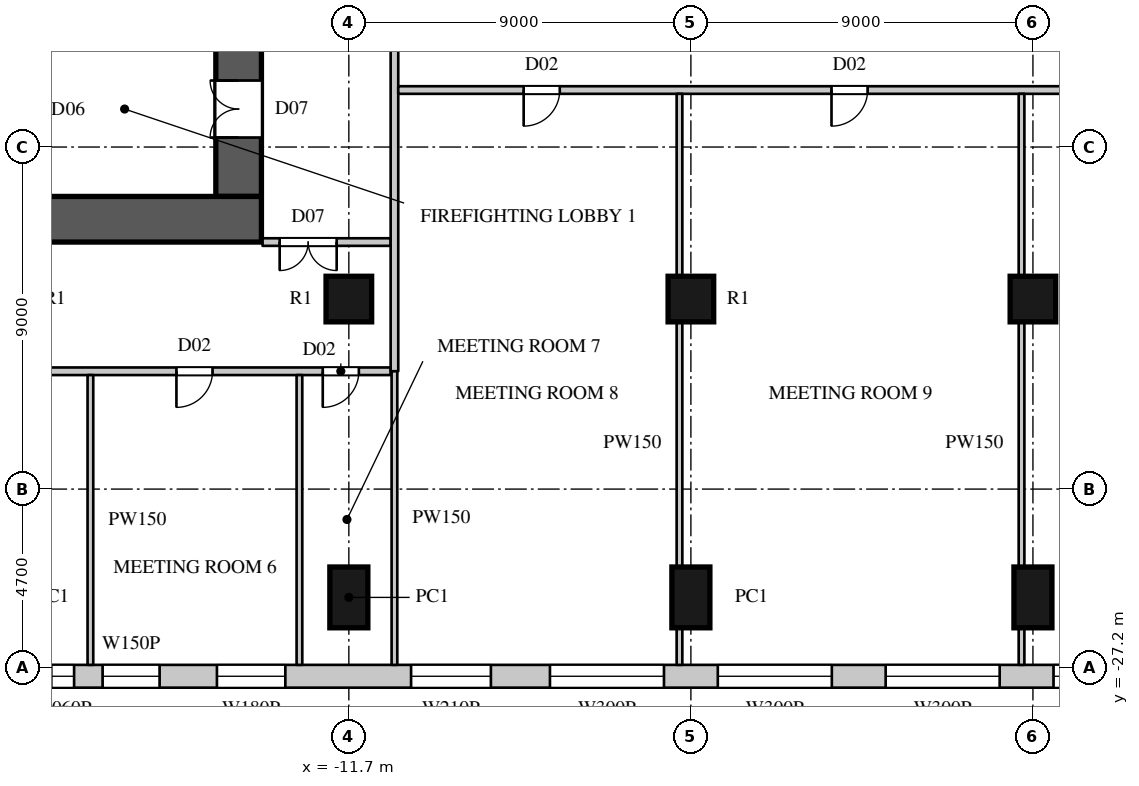
"""IFC4 building model, lengths in metres.
Left out: names, types, materials, properties, quantities, classifications, styles, units other than length and angle.
Written with IfcOpenShell. Run it as: python <this file> out.ifc"""

import sys

from ifc_helpers import new_model, si_unit, direction, frame, frame_2d, origin, origin_2d, place, context, subcontext, project, spatial, rectangle, circle, extrude, element, fill, save


model = new_model("IFC4")
c1 = context("Model", 3, precision=1e-05, world=origin(), true_north=direction((0.0, 1.0)))
c2 = subcontext(c1, "Body", "Model", "MODEL_VIEW")
j1 = project(units=[si_unit("LENGTHUNIT", "METRE"), si_unit("PLANEANGLEUNIT", "RADIAN")], contexts=[c1])
p1 = place(None, origin())
s1 = spatial("IfcSite", under=j1, at=p1, CompositionType="ELEMENT")
p2 = place(p1, origin())
s2 = spatial("IfcBuilding", under=s1, at=p2, CompositionType="ELEMENT")
p3 = place(p2, frame((0.0, 0.0, 44.0)))
s3 = spatial("IfcBuildingStorey", under=s2, at=p3, CompositionType="ELEMENT", Elevation=44.0)
for number, where, z_axis, x_axis in (
    (1, (-11.7, -25.35, 0.0), (0.0, 0.0, 1.0), (1.0, 0.0, 0.0)),
    (2, (-2.7, -25.35, 0.0), (0.0, 0.0, 1.0), (1.0, 0.0, 0.0)),
    (3, (6.3, -25.35, 0.0), (0.0, 0.0, 1.0), (1.0, 0.0, 0.0)),
):
    element("IfcColumn", number, at=place(p3, frame(where, z_axis=z_axis, x_axis=x_axis)), inside=s3, PredefinedType="COLUMN", context=c2, shape_type="SweptSolid", body=[
        extrude(rectangle(XDim=1.0, YDim=1.6, at=origin_2d()), origin(), (0.0, 0.0, 1.0), 6.0),
    ])
for number, where, z_axis, x_axis in (
    (4, (-11.7, -17.5, 0.0), (0.0, 0.0, 1.0), (1.0, 0.0, 0.0)),
    (5, (-2.7, -17.5, 0.0), (0.0, 0.0, 1.0), (1.0, 0.0, 0.0)),
    (6, (6.3, -17.5, 0.0), (0.0, 0.0, 1.0), (1.0, 0.0, 0.0)),
):
    element("IfcColumn", number, at=place(p3, frame(where, z_axis=z_axis, x_axis=x_axis)), inside=s3, PredefinedType="COLUMN", context=c2, shape_type="SweptSolid", body=[
        extrude(circle(Radius=0.6, at=origin_2d()), origin(), (0.0, 0.0, 1.0), 6.0),
    ])
p4 = place(p3, frame((-29.2, -27.425, 0.0), z_axis=(0.0, 0.0, 1.0), x_axis=(1.0, 0.0, 0.0)))
e7 = element("IfcWall", 7, at=p4, inside=s3, PredefinedType="ELEMENTEDWALL", context=c2, shape_type="SweptSolid", body=[
    extrude(rectangle(XDim=53.0, YDim=0.6, at=frame_2d((26.5, 0.0))), origin(), (0.0, 0.0, 1.0), 5.596),
])
p5 = place(p4, frame((5.125, 0.0, 1.2)))
e8 = element("IfcOpeningElement", 8, at=p5, cuts=e7, PredefinedType="OPENING", context=c2, shape_type="SweptSolid", body=[
    extrude(rectangle(XDim=3.0, YDim=2.4, at=frame_2d((1.5, 1.2))), frame((0.0, 0.31, 0.0), z_axis=(0.0, -1.0, 0.0), x_axis=(1.0, 0.0, 0.0)), (0.0, 0.0, 1.0), 0.62),
])
p6 = place(p4, frame((22.792, 0.0, 1.2)))
e9 = element("IfcOpeningElement", 9, at=p6, cuts=e7, PredefinedType="OPENING", context=c2, shape_type="SweptSolid", body=[
    extrude(rectangle(XDim=3.0, YDim=2.4, at=frame_2d((1.5, 1.2))), frame((0.0, 0.31, 0.0), z_axis=(0.0, -1.0, 0.0), x_axis=(1.0, 0.0, 0.0)), (0.0, 0.0, 1.0), 0.62),
])
p7 = place(p4, frame((27.208, 0.0, 1.2)))
e10 = element("IfcOpeningElement", 10, at=p7, cuts=e7, PredefinedType="OPENING", context=c2, shape_type="SweptSolid", body=[
    extrude(rectangle(XDim=3.0, YDim=2.4, at=frame_2d((1.5, 1.2))), frame((0.0, 0.31, 0.0), z_axis=(0.0, -1.0, 0.0), x_axis=(1.0, 0.0, 0.0)), (0.0, 0.0, 1.0), 0.62),
])
p8 = place(p4, frame((31.625, 0.0, 1.2)))
e11 = element("IfcOpeningElement", 11, at=p8, cuts=e7, PredefinedType="OPENING", context=c2, shape_type="SweptSolid", body=[
    extrude(rectangle(XDim=3.0, YDim=2.4, at=frame_2d((1.5, 1.2))), frame((0.0, 0.31, 0.0), z_axis=(0.0, -1.0, 0.0), x_axis=(1.0, 0.0, 0.0)), (0.0, 0.0, 1.0), 0.62),
])
p9 = place(p4, frame((36.042, 0.0, 1.2)))
e12 = element("IfcOpeningElement", 12, at=p9, cuts=e7, PredefinedType="OPENING", context=c2, shape_type="SweptSolid", body=[
    extrude(rectangle(XDim=3.0, YDim=2.4, at=frame_2d((1.5, 1.2))), frame((0.0, 0.31, 0.0), z_axis=(0.0, -1.0, 0.0), x_axis=(1.0, 0.0, 0.0)), (0.0, 0.0, 1.0), 0.62),
])
p10 = place(p4, frame((40.458, 0.0, 1.2)))
e13 = element("IfcOpeningElement", 13, at=p10, cuts=e7, PredefinedType="OPENING", context=c2, shape_type="SweptSolid", body=[
    extrude(rectangle(XDim=3.0, YDim=2.4, at=frame_2d((1.5, 1.2))), frame((0.0, 0.31, 0.0), z_axis=(0.0, -1.0, 0.0), x_axis=(1.0, 0.0, 0.0)), (0.0, 0.0, 1.0), 0.62),
])
p11 = place(p4, frame((44.875, 0.0, 1.2)))
e14 = element("IfcOpeningElement", 14, at=p11, cuts=e7, PredefinedType="OPENING", context=c2, shape_type="SweptSolid", body=[
    extrude(rectangle(XDim=3.0, YDim=2.4, at=frame_2d((1.5, 1.2))), frame((0.0, 0.31, 0.0), z_axis=(0.0, -1.0, 0.0), x_axis=(1.0, 0.0, 0.0)), (0.0, 0.0, 1.0), 0.62),
])
p12 = place(p4, frame((49.292, 0.0, 1.2)))
e15 = element("IfcOpeningElement", 15, at=p12, cuts=e7, PredefinedType="OPENING", context=c2, shape_type="SweptSolid", body=[
    extrude(rectangle(XDim=3.0, YDim=2.4, at=frame_2d((1.5, 1.2))), frame((0.0, 0.31, 0.0), z_axis=(0.0, -1.0, 0.0), x_axis=(1.0, 0.0, 0.0)), (0.0, 0.0, 1.0), 0.62),
])
p13 = place(p4, frame((0.754, 0.0, 1.2)))
e16 = element("IfcOpeningElement", 16, at=p13, cuts=e7, PredefinedType="OPENING", context=c2, shape_type="SweptSolid", body=[
    extrude(rectangle(XDim=2.1, YDim=2.4, at=frame_2d((1.05, 1.2))), frame((0.0, 0.31, 0.0), z_axis=(0.0, -1.0, 0.0), x_axis=(1.0, 0.0, 0.0)), (0.0, 0.0, 1.0), 0.62),
])
p14 = place(p4, frame((9.671, 0.0, 1.2)))
e17 = element("IfcOpeningElement", 17, at=p14, cuts=e7, PredefinedType="OPENING", context=c2, shape_type="SweptSolid", body=[
    extrude(rectangle(XDim=0.6, YDim=2.4, at=frame_2d((0.3, 1.2))), frame((0.0, 0.31, 0.0), z_axis=(0.0, -1.0, 0.0), x_axis=(1.0, 0.0, 0.0)), (0.0, 0.0, 1.0), 0.62),
])
p15 = place(p4, frame((11.021, 0.0, 1.2)))
e18 = element("IfcOpeningElement", 18, at=p15, cuts=e7, PredefinedType="OPENING", context=c2, shape_type="SweptSolid", body=[
    extrude(rectangle(XDim=1.5, YDim=2.4, at=frame_2d((0.75, 1.2))), frame((0.0, 0.31, 0.0), z_axis=(0.0, -1.0, 0.0), x_axis=(1.0, 0.0, 0.0)), (0.0, 0.0, 1.0), 0.62),
])
p16 = place(p4, frame((14.029, 0.0, 1.2)))
e19 = element("IfcOpeningElement", 19, at=p16, cuts=e7, PredefinedType="OPENING", context=c2, shape_type="SweptSolid", body=[
    extrude(rectangle(XDim=1.8, YDim=2.4, at=frame_2d((0.9, 1.2))), frame((0.0, 0.31, 0.0), z_axis=(0.0, -1.0, 0.0), x_axis=(1.0, 0.0, 0.0)), (0.0, 0.0, 1.0), 0.62),
])
p17 = place(p4, frame((19.137, 0.0, 1.2)))
e20 = element("IfcOpeningElement", 20, at=p17, cuts=e7, PredefinedType="OPENING", context=c2, shape_type="SweptSolid", body=[
    extrude(rectangle(XDim=2.1, YDim=2.4, at=frame_2d((1.05, 1.2))), frame((0.0, 0.31, 0.0), z_axis=(0.0, -1.0, 0.0), x_axis=(1.0, 0.0, 0.0)), (0.0, 0.0, 1.0), 0.62),
])
p18 = place(p3, frame((-30.0, -15.4, 0.0), z_axis=(0.0, 0.0, 1.0), x_axis=(1.0, 0.0, 0.0)))
e21 = element("IfcWall", 21, at=p18, inside=s3, PredefinedType="SHEAR", context=c2, shape_type="SweptSolid", body=[
    extrude(rectangle(XDim=16.0, YDim=1.2, at=frame_2d((8.0, 0.0))), origin(), (0.0, 0.0, 1.0), 6.0),
])
p19 = place(p3, frame((-14.6, -14.8, 0.0), z_axis=(0.0, 0.0, 1.0), x_axis=(0.0, 1.0, 0.0)))
e22 = element("IfcWall", 22, at=p19, inside=s3, PredefinedType="SHEAR", context=c2, shape_type="SweptSolid", body=[
    extrude(rectangle(XDim=29.6, YDim=1.2, at=frame_2d((14.8, 0.0))), origin(), (0.0, 0.0, 1.0), 6.0),
])
p20 = place(p19, frame((1.55, 0.0, 0.0)))
e23 = element("IfcOpeningElement", 23, at=p20, cuts=e22, PredefinedType="OPENING", context=c2, shape_type="SweptSolid", body=[
    extrude(rectangle(XDim=1.5, YDim=2.4, at=frame_2d((0.75, 1.2))), frame((0.0, 0.61, 0.0), z_axis=(0.0, -1.0, 0.0), x_axis=(1.0, 0.0, 0.0)), (0.0, 0.0, 1.0), 1.22),
])
p21 = place(p19, frame((26.55, 0.0, 0.0)))
e24 = element("IfcOpeningElement", 24, at=p21, cuts=e22, PredefinedType="OPENING", context=c2, shape_type="SweptSolid", body=[
    extrude(rectangle(XDim=1.5, YDim=2.4, at=frame_2d((0.75, 1.2))), frame((0.0, 0.61, 0.0), z_axis=(0.0, -1.0, 0.0), x_axis=(1.0, 0.0, 0.0)), (0.0, 0.0, 1.0), 1.22),
])
p22 = place(p19, frame((8.45, 0.0, 0.0)))
e25 = element("IfcOpeningElement", 25, at=p22, cuts=e22, PredefinedType="OPENING", context=c2, shape_type="SweptSolid", body=[
    extrude(rectangle(XDim=1.5, YDim=2.4, at=frame_2d((0.75, 1.2))), frame((0.0, 0.61, 0.0), z_axis=(0.0, -1.0, 0.0), x_axis=(1.0, 0.0, 0.0)), (0.0, 0.0, 1.0), 1.22),
])
p23 = place(p19, frame((19.65, 0.0, 0.0)))
e26 = element("IfcOpeningElement", 26, at=p23, cuts=e22, PredefinedType="OPENING", context=c2, shape_type="SweptSolid", body=[
    extrude(rectangle(XDim=1.5, YDim=2.4, at=frame_2d((0.75, 1.2))), frame((0.0, 0.61, 0.0), z_axis=(0.0, -1.0, 0.0), x_axis=(1.0, 0.0, 0.0)), (0.0, 0.0, 1.0), 1.22),
])
p24 = place(p19, frame((14.5, 0.0, 0.0)))
e27 = element("IfcOpeningElement", 27, at=p24, cuts=e22, PredefinedType="OPENING", context=c2, shape_type="SweptSolid", body=[
    extrude(rectangle(XDim=0.6, YDim=2.0, at=frame_2d((0.3, 1.0))), frame((0.0, 0.61, 0.0), z_axis=(0.0, -1.0, 0.0), x_axis=(1.0, 0.0, 0.0)), (0.0, 0.0, 1.0), 1.22),
])
p25 = place(p3, frame((-23.687, -19.4, 0.0), z_axis=(0.0, 0.0, 1.0), x_axis=(1.0, 0.0, 0.0)))
e28 = element("IfcWall", 28, at=p25, inside=s3, PredefinedType="PARTITIONING", context=c2, shape_type="SweptSolid", body=[
    extrude(rectangle(XDim=13.086, YDim=0.2, at=frame_2d((6.543, 0.0))), origin(), (0.0, 0.0, 1.0), 5.596),
])
p26 = place(p25, frame((2.2, 0.0, 0.0)))
e29 = element("IfcOpeningElement", 29, at=p26, cuts=e28, PredefinedType="OPENING", context=c2, shape_type="SweptSolid", body=[
    extrude(rectangle(XDim=0.95, YDim=2.2, at=frame_2d((0.475, 1.1))), frame((0.0, 0.11, 0.0), z_axis=(0.0, -1.0, 0.0), x_axis=(1.0, 0.0, 0.0)), (0.0, 0.0, 1.0), 0.22),
])
p27 = place(p25, frame((7.45, 0.0, 0.0)))
e30 = element("IfcOpeningElement", 30, at=p27, cuts=e28, PredefinedType="OPENING", context=c2, shape_type="SweptSolid", body=[
    extrude(rectangle(XDim=0.95, YDim=2.2, at=frame_2d((0.475, 1.1))), frame((0.0, 0.11, 0.0), z_axis=(0.0, -1.0, 0.0), x_axis=(1.0, 0.0, 0.0)), (0.0, 0.0, 1.0), 0.22),
])
p28 = place(p25, frame((11.3, 0.0, 0.0)))
e31 = element("IfcOpeningElement", 31, at=p28, cuts=e28, PredefinedType="OPENING", context=c2, shape_type="SweptSolid", body=[
    extrude(rectangle(XDim=0.95, YDim=2.2, at=frame_2d((0.475, 1.1))), frame((0.0, 0.11, 0.0), z_axis=(0.0, -1.0, 0.0), x_axis=(1.0, 0.0, 0.0)), (0.0, 0.0, 1.0), 0.22),
])
p29 = place(p3, frame((-13.97, -16.0, 0.0), z_axis=(0.0, 0.0, 1.0), x_axis=(1.0, 0.0, 0.0)))
e32 = element("IfcWall", 32, at=p29, inside=s3, PredefinedType="PARTITIONING", context=c2, shape_type="SweptSolid", body=[
    extrude(rectangle(XDim=3.37, YDim=0.2, at=frame_2d((1.685, 0.0))), origin(), (0.0, 0.0, 1.0), 5.596),
])
p30 = place(p29, frame((0.45, 0.0, 0.0)))
e33 = element("IfcOpeningElement", 33, at=p30, cuts=e32, PredefinedType="OPENING", context=c2, shape_type="SweptSolid", body=[
    extrude(rectangle(XDim=1.5, YDim=2.4, at=frame_2d((0.75, 1.2))), frame((0.0, 0.11, 0.0), z_axis=(0.0, -1.0, 0.0), x_axis=(1.0, 0.0, 0.0)), (0.0, 0.0, 1.0), 0.22),
])
p31 = place(p3, frame((-10.5, -19.4, 0.0), z_axis=(0.0, 0.0, 1.0), x_axis=(0.0, 1.0, 0.0)))
e34 = element("IfcWall", 34, at=p31, inside=s3, PredefinedType="PARTITIONING", context=c2, shape_type="SweptSolid", body=[
    extrude(rectangle(XDim=38.8, YDim=0.2, at=frame_2d((19.4, 0.0))), origin(), (0.0, 0.0, 1.0), 5.596),
])
p32 = place(p31, frame((18.65, 0.0, 0.0)))
e35 = element("IfcOpeningElement", 35, at=p32, cuts=e34, PredefinedType="OPENING", context=c2, shape_type="SweptSolid", body=[
    extrude(rectangle(XDim=1.5, YDim=2.4, at=frame_2d((0.75, 1.2))), frame((0.0, 0.11, 0.0), z_axis=(0.0, -1.0, 0.0), x_axis=(1.0, 0.0, 0.0)), (0.0, 0.0, 1.0), 0.22),
])
p33 = place(p3, frame((-10.4, -12.0, 0.0), z_axis=(0.0, 0.0, 1.0), x_axis=(1.0, 0.0, 0.0)))
e36 = element("IfcWall", 36, at=p33, inside=s3, PredefinedType="PARTITIONING", context=c2, shape_type="SweptSolid", body=[
    extrude(rectangle(XDim=24.8, YDim=0.2, at=frame_2d((12.4, 0.0))), origin(), (0.0, 0.0, 1.0), 5.596),
])
p34 = place(p33, frame((3.3, 0.0, 0.0)))
e37 = element("IfcOpeningElement", 37, at=p34, cuts=e36, PredefinedType="OPENING", context=c2, shape_type="SweptSolid", body=[
    extrude(rectangle(XDim=0.95, YDim=2.2, at=frame_2d((0.475, 1.1))), frame((0.0, 0.11, 0.0), z_axis=(0.0, -1.0, 0.0), x_axis=(1.0, 0.0, 0.0)), (0.0, 0.0, 1.0), 0.22),
])
p35 = place(p33, frame((11.4, 0.0, 0.0)))
e38 = element("IfcOpeningElement", 38, at=p35, cuts=e36, PredefinedType="OPENING", context=c2, shape_type="SweptSolid", body=[
    extrude(rectangle(XDim=0.95, YDim=2.2, at=frame_2d((0.475, 1.1))), frame((0.0, 0.11, 0.0), z_axis=(0.0, -1.0, 0.0), x_axis=(1.0, 0.0, 0.0)), (0.0, 0.0, 1.0), 0.22),
])
p36 = place(p33, frame((20.05, 0.0, 0.0)))
e39 = element("IfcOpeningElement", 39, at=p36, cuts=e36, PredefinedType="OPENING", context=c2, shape_type="SweptSolid", body=[
    extrude(rectangle(XDim=0.95, YDim=2.2, at=frame_2d((0.475, 1.1))), frame((0.0, 0.11, 0.0), z_axis=(0.0, -1.0, 0.0), x_axis=(1.0, 0.0, 0.0)), (0.0, 0.0, 1.0), 0.22),
])
for number, where, z_axis, x_axis in (
    (40, (-18.5, -27.125, 0.0), (0.0, 0.0, 1.0), (0.0, 1.0, 0.0)),
    (41, (-13.0, -27.125, 0.0), (0.0, 0.0, 1.0), (0.0, 1.0, 0.0)),
):
    element("IfcWall", number, at=place(p3, frame(where, z_axis=z_axis, x_axis=x_axis)), inside=s3, PredefinedType="PARTITIONING", context=c2, shape_type="SweptSolid", body=[
        extrude(rectangle(XDim=7.625, YDim=0.15, at=frame_2d((3.812, 0.0))), origin(), (0.0, 0.0, 1.0), 5.596),
    ])
p37 = place(p3, frame((-10.5, -27.125, 0.0), z_axis=(0.0, 0.0, 1.0), x_axis=(0.0, 1.0, 0.0)))
e42 = element("IfcWall", 42, at=p37, inside=s3, PredefinedType="PARTITIONING", context=c2, shape_type="SweptSolid", body=[
    extrude(rectangle(XDim=7.725, YDim=0.15, at=frame_2d((3.863, 0.0))), origin(), (0.0, 0.0, 1.0), 5.596),
])
p38 = place(p3, frame((-3.0, -27.125, 0.0), z_axis=(0.0, 0.0, 1.0), x_axis=(0.0, 1.0, 0.0)))
e43 = element("IfcWall", 43, at=p38, inside=s3, PredefinedType="PARTITIONING", context=c2, shape_type="SweptSolid", body=[
    extrude(rectangle(XDim=0.975, YDim=0.15, at=frame_2d((0.488, 0.0))), origin(), (0.0, 0.0, 1.0), 5.596),
])
p39 = place(p3, frame((-3.0, -24.55, 0.0), z_axis=(0.0, 0.0, 1.0), x_axis=(0.0, 1.0, 0.0)))
e44 = element("IfcWall", 44, at=p39, inside=s3, PredefinedType="PARTITIONING", context=c2, shape_type="SweptSolid", body=[
    extrude(rectangle(XDim=6.503, YDim=0.15, at=frame_2d((3.252, 0.0))), origin(), (0.0, 0.0, 1.0), 5.596),
])
p40 = place(p3, frame((-3.0, -16.953, 0.0), z_axis=(0.0, 0.0, 1.0), x_axis=(0.0, 1.0, 0.0)))
e45 = element("IfcWall", 45, at=p40, inside=s3, PredefinedType="PARTITIONING", context=c2, shape_type="SweptSolid", body=[
    extrude(rectangle(XDim=4.853, YDim=0.15, at=frame_2d((2.427, 0.0))), origin(), (0.0, 0.0, 1.0), 5.596),
])
p41 = place(p3, frame((6.0, -27.125, 0.0), z_axis=(0.0, 0.0, 1.0), x_axis=(0.0, 1.0, 0.0)))
e46 = element("IfcWall", 46, at=p41, inside=s3, PredefinedType="PARTITIONING", context=c2, shape_type="SweptSolid", body=[
    extrude(rectangle(XDim=0.975, YDim=0.15, at=frame_2d((0.488, 0.0))), origin(), (0.0, 0.0, 1.0), 5.596),
])
p42 = place(p3, frame((6.0, -24.55, 0.0), z_axis=(0.0, 0.0, 1.0), x_axis=(0.0, 1.0, 0.0)))
e47 = element("IfcWall", 47, at=p42, inside=s3, PredefinedType="PARTITIONING", context=c2, shape_type="SweptSolid", body=[
    extrude(rectangle(XDim=6.503, YDim=0.15, at=frame_2d((3.252, 0.0))), origin(), (0.0, 0.0, 1.0), 5.596),
])
p43 = place(p3, frame((6.0, -16.953, 0.0), z_axis=(0.0, 0.0, 1.0), x_axis=(0.0, 1.0, 0.0)))
e48 = element("IfcWall", 48, at=p43, inside=s3, PredefinedType="PARTITIONING", context=c2, shape_type="SweptSolid", body=[
    extrude(rectangle(XDim=4.853, YDim=0.15, at=frame_2d((2.427, 0.0))), origin(), (0.0, 0.0, 1.0), 5.596),
])
p44 = place(p6, origin())
e49 = element("IfcWindow", 49, at=p44, inside=s3, PartitioningType="SINGLE_PANEL", PredefinedType="WINDOW", context=c2, shape_type="SweptSolid", body=[
    extrude(rectangle(XDim=3.0, YDim=2.4, at=frame_2d((1.5, 1.2))), frame((0.0, 0.06, 0.0), z_axis=(0.0, -1.0, 0.0), x_axis=(1.0, 0.0, 0.0)), (0.0, 0.0, 1.0), 0.06),
])
fill(e9, e49)
p45 = place(p7, origin())
e50 = element("IfcWindow", 50, at=p45, inside=s3, PartitioningType="SINGLE_PANEL", PredefinedType="WINDOW", context=c2, shape_type="SweptSolid", body=[
    extrude(rectangle(XDim=3.0, YDim=2.4, at=frame_2d((1.5, 1.2))), frame((0.0, 0.06, 0.0), z_axis=(0.0, -1.0, 0.0), x_axis=(1.0, 0.0, 0.0)), (0.0, 0.0, 1.0), 0.06),
])
fill(e10, e50)
p46 = place(p8, origin())
e51 = element("IfcWindow", 51, at=p46, inside=s3, PartitioningType="SINGLE_PANEL", PredefinedType="WINDOW", context=c2, shape_type="SweptSolid", body=[
    extrude(rectangle(XDim=3.0, YDim=2.4, at=frame_2d((1.5, 1.2))), frame((0.0, 0.06, 0.0), z_axis=(0.0, -1.0, 0.0), x_axis=(1.0, 0.0, 0.0)), (0.0, 0.0, 1.0), 0.06),
])
fill(e11, e51)
p47 = place(p9, origin())
e52 = element("IfcWindow", 52, at=p47, inside=s3, PartitioningType="SINGLE_PANEL", PredefinedType="WINDOW", context=c2, shape_type="SweptSolid", body=[
    extrude(rectangle(XDim=3.0, YDim=2.4, at=frame_2d((1.5, 1.2))), frame((0.0, 0.06, 0.0), z_axis=(0.0, -1.0, 0.0), x_axis=(1.0, 0.0, 0.0)), (0.0, 0.0, 1.0), 0.06),
])
fill(e12, e52)
p48 = place(p30, origin())
e53 = element("IfcDoor", 53, at=p48, inside=s3, OperationType="DOUBLE_DOOR_SINGLE_SWING", PredefinedType="DOOR", context=c2, shape_type="SweptSolid", body=[
    extrude(rectangle(XDim=1.5, YDim=2.4, at=frame_2d((0.75, 1.2))), frame((0.0, 0.025, 0.0), z_axis=(0.0, -1.0, 0.0), x_axis=(1.0, 0.0, 0.0)), (0.0, 0.0, 1.0), 0.05),
])
fill(e33, e53)
p49 = place(p27, origin())
e54 = element("IfcDoor", 54, at=p49, inside=s3, OperationType="SINGLE_SWING_RIGHT", PredefinedType="DOOR", context=c2, shape_type="SweptSolid", body=[
    extrude(rectangle(XDim=0.95, YDim=2.2, at=frame_2d((0.475, 1.1))), frame((0.0, 0.025, 0.0), z_axis=(0.0, -1.0, 0.0), x_axis=(1.0, 0.0, 0.0)), (0.0, 0.0, 1.0), 0.05),
])
fill(e30, e54)
p50 = place(p28, origin())
e55 = element("IfcDoor", 55, at=p50, inside=s3, OperationType="SINGLE_SWING_RIGHT", PredefinedType="DOOR", context=c2, shape_type="SweptSolid", body=[
    extrude(rectangle(XDim=0.95, YDim=2.2, at=frame_2d((0.475, 1.1))), frame((0.0, 0.025, 0.0), z_axis=(0.0, -1.0, 0.0), x_axis=(1.0, 0.0, 0.0)), (0.0, 0.0, 1.0), 0.05),
])
fill(e31, e55)
p51 = place(p34, origin())
e56 = element("IfcDoor", 56, at=p51, inside=s3, OperationType="SINGLE_SWING_RIGHT", PredefinedType="DOOR", context=c2, shape_type="SweptSolid", body=[
    extrude(rectangle(XDim=0.95, YDim=2.2, at=frame_2d((0.475, 1.1))), frame((0.0, 0.025, 0.0), z_axis=(0.0, -1.0, 0.0), x_axis=(1.0, 0.0, 0.0)), (0.0, 0.0, 1.0), 0.05),
])
fill(e37, e56)
p52 = place(p35, origin())
e57 = element("IfcDoor", 57, at=p52, inside=s3, OperationType="SINGLE_SWING_RIGHT", PredefinedType="DOOR", context=c2, shape_type="SweptSolid", body=[
    extrude(rectangle(XDim=0.95, YDim=2.2, at=frame_2d((0.475, 1.1))), frame((0.0, 0.025, 0.0), z_axis=(0.0, -1.0, 0.0), x_axis=(1.0, 0.0, 0.0)), (0.0, 0.0, 1.0), 0.05),
])
fill(e38, e57)
p53 = place(p20, origin())
e58 = element("IfcDoor", 58, at=p53, inside=s3, OperationType="DOUBLE_DOOR_SINGLE_SWING", PredefinedType="DOOR", context=c2, shape_type="SweptSolid", body=[
    extrude(rectangle(XDim=1.5, YDim=2.4, at=frame_2d((0.75, 1.2))), frame((0.0, 0.025, 0.0), z_axis=(0.0, -1.0, 0.0), x_axis=(1.0, 0.0, 0.0)), (0.0, 0.0, 1.0), 0.05),
])
fill(e23, e58)
p54 = place(p14, origin())
e59 = element("IfcWindow", 59, at=p54, inside=s3, PartitioningType="SINGLE_PANEL", PredefinedType="WINDOW", context=c2, shape_type="SweptSolid", body=[
    extrude(rectangle(XDim=0.6, YDim=2.4, at=frame_2d((0.3, 1.2))), frame((0.0, 0.06, 0.0), z_axis=(0.0, -1.0, 0.0), x_axis=(1.0, 0.0, 0.0)), (0.0, 0.0, 1.0), 0.06),
])
fill(e17, e59)
p55 = place(p15, origin())
e60 = element("IfcWindow", 60, at=p55, inside=s3, PartitioningType="SINGLE_PANEL", PredefinedType="WINDOW", context=c2, shape_type="SweptSolid", body=[
    extrude(rectangle(XDim=1.5, YDim=2.4, at=frame_2d((0.75, 1.2))), frame((0.0, 0.06, 0.0), z_axis=(0.0, -1.0, 0.0), x_axis=(1.0, 0.0, 0.0)), (0.0, 0.0, 1.0), 0.06),
])
fill(e18, e60)
p56 = place(p16, origin())
e61 = element("IfcWindow", 61, at=p56, inside=s3, PartitioningType="SINGLE_PANEL", PredefinedType="WINDOW", context=c2, shape_type="SweptSolid", body=[
    extrude(rectangle(XDim=1.8, YDim=2.4, at=frame_2d((0.9, 1.2))), frame((0.0, 0.06, 0.0), z_axis=(0.0, -1.0, 0.0), x_axis=(1.0, 0.0, 0.0)), (0.0, 0.0, 1.0), 0.06),
])
fill(e19, e61)
p57 = place(p17, origin())
e62 = element("IfcWindow", 62, at=p57, inside=s3, PartitioningType="SINGLE_PANEL", PredefinedType="WINDOW", context=c2, shape_type="SweptSolid", body=[
    extrude(rectangle(XDim=2.1, YDim=2.4, at=frame_2d((1.05, 1.2))), frame((0.0, 0.06, 0.0), z_axis=(0.0, -1.0, 0.0), x_axis=(1.0, 0.0, 0.0)), (0.0, 0.0, 1.0), 0.06),
])
fill(e20, e62)
save(model, sys.argv[1])
